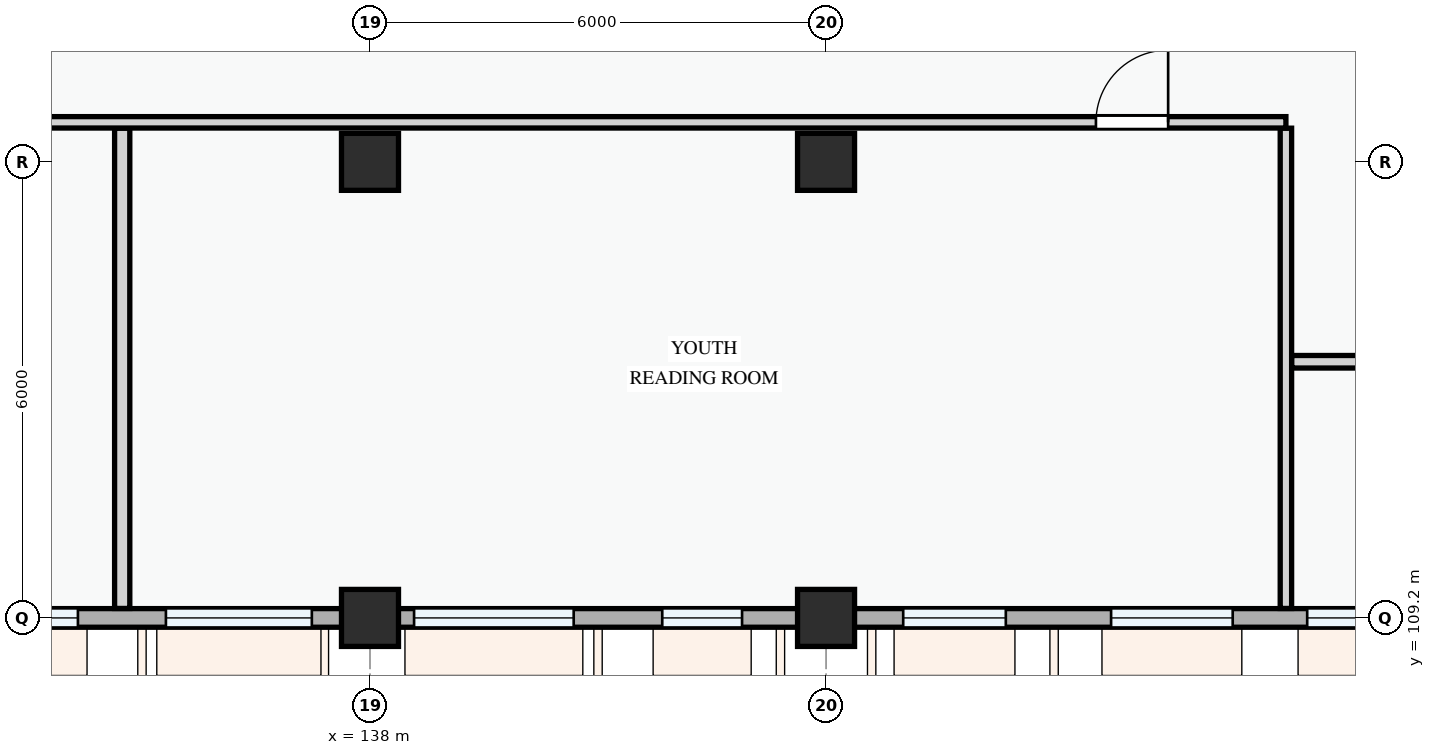
"""IFC4 building model, lengths in metres.
Left out: names, types, materials, properties, quantities, classifications, styles, units other than length and angle.
Written with IfcOpenShell. Run it as: python <this file> out.ifc"""

import sys

from ifc_helpers import new_model, si_unit, direction, frame, frame_2d, origin, origin_2d, place, context, subcontext, project, spatial, rectangle, extrude, element, fill, save


model = new_model("IFC4")
c1 = context("Model", 3, precision=1e-05, world=origin(), true_north=direction((0.0, 1.0)))
c2 = subcontext(c1, "Body", "Model", "MODEL_VIEW")
j1 = project(units=[si_unit("LENGTHUNIT", "METRE"), si_unit("PLANEANGLEUNIT", "RADIAN")], contexts=[c1])
p1 = place(None, origin())
s1 = spatial("IfcSite", under=j1, at=p1, CompositionType="ELEMENT")
p2 = place(p1, origin())
s2 = spatial("IfcBuilding", under=s1, at=p2, CompositionType="ELEMENT")
p3 = place(p2, frame((0.0, 0.0, 4.5)))
s3 = spatial("IfcBuildingStorey", under=s2, at=p3, CompositionType="ELEMENT", Elevation=4.5)
for number, where, z_axis, x_axis in (
    (1, (138.0, 109.2, 0.0), (0.0, 0.0, 1.0), (1.0, 0.0, 0.0)),
    (2, (138.0, 115.2, 0.0), (0.0, 0.0, 1.0), (1.0, 0.0, 0.0)),
    (3, (144.0, 109.2, 0.0), (0.0, 0.0, 1.0), (1.0, 0.0, 0.0)),
    (4, (144.0, 115.2, 0.0), (0.0, 0.0, 1.0), (1.0, 0.0, 0.0)),
):
    element("IfcColumn", number, at=place(p3, frame(where, z_axis=z_axis, x_axis=x_axis)), inside=s3, PredefinedType="COLUMN", context=c2, shape_type="SweptSolid", body=[
        extrude(rectangle(XDim=0.75, YDim=0.75, at=origin_2d()), origin(), (0.0, 0.0, 1.0), 3.6),
    ])
p4 = place(p3, frame((129.6, 109.2, 0.0), z_axis=(0.0, 0.0, 1.0), x_axis=(1.0, 0.0, 0.0)))
e5 = element("IfcWall", 5, at=p4, inside=s3, PredefinedType="STANDARD", context=c2, shape_type="SweptSolid", body=[
    extrude(rectangle(XDim=8.4, YDim=0.245, at=frame_2d((4.2, 0.0))), origin(), (0.0, 0.0, 1.0), 2.675),
])
p5 = place(p4, frame((0.488, 0.0, 0.78)))
e6 = element("IfcOpeningElement", 6, at=p5, cuts=e5, PredefinedType="OPENING", context=c2, shape_type="SweptSolid", body=[
    extrude(rectangle(XDim=1.95, YDim=1.65, at=frame_2d((0.975, 0.825))), frame((0.0, 0.133, 0.0), z_axis=(0.0, -1.0, 0.0), x_axis=(1.0, 0.0, 0.0)), (0.0, 0.0, 1.0), 0.265),
])
p6 = place(p4, frame((3.177, 0.0, 0.78)))
e7 = element("IfcOpeningElement", 7, at=p6, cuts=e5, PredefinedType="OPENING", context=c2, shape_type="SweptSolid", body=[
    extrude(rectangle(XDim=1.38, YDim=1.48, at=frame_2d((0.69, 0.74))), frame((0.0, 0.133, 0.0), z_axis=(0.0, -1.0, 0.0), x_axis=(1.0, 0.0, 0.0)), (0.0, 0.0, 1.0), 0.265),
])
p7 = place(p4, frame((5.715, 0.0, 0.78)))
e8 = element("IfcOpeningElement", 8, at=p7, cuts=e5, PredefinedType="OPENING", context=c2, shape_type="SweptSolid", body=[
    extrude(rectangle(XDim=1.92, YDim=1.44, at=frame_2d((0.96, 0.72))), frame((0.0, 0.133, 0.0), z_axis=(0.0, -1.0, 0.0), x_axis=(1.0, 0.0, 0.0)), (0.0, 0.0, 1.0), 0.265),
])
p8 = place(p3, frame((138.0, 109.2, 0.0), z_axis=(0.0, 0.0, 1.0), x_axis=(1.0, 0.0, 0.0)))
e9 = element("IfcWall", 9, at=p8, inside=s3, PredefinedType="STANDARD", context=c2, shape_type="SweptSolid", body=[
    extrude(rectangle(XDim=6.0, YDim=0.245, at=frame_2d((3.0, 0.0))), origin(), (0.0, 0.0, 1.0), 2.775),
])
p9 = place(p8, frame((0.58, 0.0, 0.78)))
e10 = element("IfcOpeningElement", 10, at=p9, cuts=e9, PredefinedType="OPENING", context=c2, shape_type="SweptSolid", body=[
    extrude(rectangle(XDim=2.1, YDim=1.8, at=frame_2d((1.05, 0.9))), frame((0.0, 0.133, 0.0), z_axis=(0.0, -1.0, 0.0), x_axis=(1.0, 0.0, 0.0)), (0.0, 0.0, 1.0), 0.265),
])
p10 = place(p8, frame((3.845, 0.0, 0.78)))
e11 = element("IfcOpeningElement", 11, at=p10, cuts=e9, PredefinedType="OPENING", context=c2, shape_type="SweptSolid", body=[
    extrude(rectangle(XDim=1.05, YDim=1.2, at=frame_2d((0.525, 0.6))), frame((0.0, 0.133, 0.0), z_axis=(0.0, -1.0, 0.0), x_axis=(1.0, 0.0, 0.0)), (0.0, 0.0, 1.0), 0.265),
])
p11 = place(p3, frame((144.0, 109.2, 0.0), z_axis=(0.0, 0.0, 1.0), x_axis=(1.0, 0.0, 0.0)))
e12 = element("IfcWall", 12, at=p11, inside=s3, PredefinedType="STANDARD", context=c2, shape_type="SweptSolid", body=[
    extrude(rectangle(XDim=8.4, YDim=0.245, at=frame_2d((4.2, 0.0))), origin(), (0.0, 0.0, 1.0), 2.675),
])
p12 = place(p11, frame((1.015, 0.0, 0.78)))
e13 = element("IfcOpeningElement", 13, at=p12, cuts=e12, PredefinedType="OPENING", context=c2, shape_type="SweptSolid", body=[
    extrude(rectangle(XDim=1.35, YDim=1.55, at=frame_2d((0.675, 0.775))), frame((0.0, 0.133, 0.0), z_axis=(0.0, -1.0, 0.0), x_axis=(1.0, 0.0, 0.0)), (0.0, 0.0, 1.0), 0.265),
])
p13 = place(p11, frame((3.75, 0.0, 0.78)))
e14 = element("IfcOpeningElement", 14, at=p13, cuts=e12, PredefinedType="OPENING", context=c2, shape_type="SweptSolid", body=[
    extrude(rectangle(XDim=1.6, YDim=1.75, at=frame_2d((0.8, 0.875))), frame((0.0, 0.133, 0.0), z_axis=(0.0, -1.0, 0.0), x_axis=(1.0, 0.0, 0.0)), (0.0, 0.0, 1.0), 0.265),
])
p14 = place(p11, frame((6.33, 0.0, 0.78)))
e15 = element("IfcOpeningElement", 15, at=p14, cuts=e12, PredefinedType="OPENING", context=c2, shape_type="SweptSolid", body=[
    extrude(rectangle(XDim=1.6, YDim=1.75, at=frame_2d((0.8, 0.875))), frame((0.0, 0.133, 0.0), z_axis=(0.0, -1.0, 0.0), x_axis=(1.0, 0.0, 0.0)), (0.0, 0.0, 1.0), 0.265),
])
p15 = place(p3, frame((150.05, 109.324, 0.0), z_axis=(0.0, 0.0, 1.0), x_axis=(0.0, 1.0, 0.0)))
e16 = element("IfcWall", 16, at=p15, inside=s3, PredefinedType="PARTITIONING", context=c2, shape_type="SweptSolid", body=[
    extrude(rectangle(XDim=6.319, YDim=0.15, at=frame_2d((3.159, 0.0))), origin(), (0.0, 0.0, 1.0), 3.3),
])
p16 = place(p3, frame((150.127, 112.57, 0.0), z_axis=(0.0, 0.0, 1.0), x_axis=(1.0, 0.0, 0.0)))
e17 = element("IfcWall", 17, at=p16, inside=s3, PredefinedType="PARTITIONING", context=c2, shape_type="SweptSolid", body=[
    extrude(rectangle(XDim=2.413, YDim=0.165, at=frame_2d((1.207, 0.0))), origin(), (0.0, 0.0, 1.0), 3.3),
])
p17 = place(p3, frame((134.74, 109.324, 0.0), z_axis=(0.0, 0.0, 1.0), x_axis=(0.0, 1.0, 0.0)))
e18 = element("IfcWall", 18, at=p17, inside=s3, PredefinedType="PARTITIONING", context=c2, shape_type="SweptSolid", body=[
    extrude(rectangle(XDim=6.319, YDim=0.2, at=frame_2d((3.159, 0.0))), origin(), (0.0, 0.0, 1.0), 3.3),
])
p18 = place(p3, frame((80.524, 115.72, 0.0), z_axis=(0.0, 0.0, 1.0), x_axis=(1.0, 0.0, 0.0)))
e19 = element("IfcWall", 19, at=p18, inside=s3, PredefinedType="PARTITIONING", context=c2, shape_type="SweptSolid", body=[
    extrude(rectangle(XDim=69.526, YDim=0.15, at=frame_2d((34.763, 0.0))), origin(), (0.0, 0.0, 1.0), 3.3),
])
p19 = place(p18, frame((9.656, 0.0, 0.0)))
e20 = element("IfcOpeningElement", 20, at=p19, cuts=e19, PredefinedType="OPENING", context=c2, shape_type="SweptSolid", body=[
    extrude(rectangle(XDim=0.95, YDim=2.1, at=frame_2d((0.475, 1.05))), frame((0.0, 0.085, 0.0), z_axis=(0.0, -1.0, 0.0), x_axis=(1.0, 0.0, 0.0)), (0.0, 0.0, 1.0), 0.17),
])
p20 = place(p18, frame((24.2, 0.0, 0.0)))
e21 = element("IfcOpeningElement", 21, at=p20, cuts=e19, PredefinedType="OPENING", context=c2, shape_type="SweptSolid", body=[
    extrude(rectangle(XDim=0.95, YDim=2.1, at=frame_2d((0.475, 1.05))), frame((0.0, 0.085, 0.0), z_axis=(0.0, -1.0, 0.0), x_axis=(1.0, 0.0, 0.0)), (0.0, 0.0, 1.0), 0.17),
])
p21 = place(p18, frame((38.208, 0.0, 0.0)))
e22 = element("IfcOpeningElement", 22, at=p21, cuts=e19, PredefinedType="OPENING", context=c2, shape_type="SweptSolid", body=[
    extrude(rectangle(XDim=0.95, YDim=2.1, at=frame_2d((0.475, 1.05))), frame((0.0, 0.085, 0.0), z_axis=(0.0, -1.0, 0.0), x_axis=(1.0, 0.0, 0.0)), (0.0, 0.0, 1.0), 0.17),
])
p22 = place(p18, frame((67.026, 0.0, 0.0)))
e23 = element("IfcOpeningElement", 23, at=p22, cuts=e19, PredefinedType="OPENING", context=c2, shape_type="SweptSolid", body=[
    extrude(rectangle(XDim=0.95, YDim=2.1, at=frame_2d((0.475, 1.05))), frame((0.0, 0.085, 0.0), z_axis=(0.0, -1.0, 0.0), x_axis=(1.0, 0.0, 0.0)), (0.0, 0.0, 1.0), 0.17),
])
p23 = place(p6, origin())
e24 = element("IfcWindow", 24, at=p23, inside=s3, PartitioningType="SINGLE_PANEL", PredefinedType="WINDOW", context=c2, shape_type="SweptSolid", body=[
    extrude(rectangle(XDim=1.38, YDim=1.48, at=frame_2d((0.69, 0.74))), frame((0.0, 0.03, 0.0), z_axis=(0.0, -1.0, 0.0), x_axis=(1.0, 0.0, 0.0)), (0.0, 0.0, 1.0), 0.06),
])
fill(e7, e24)
p24 = place(p7, origin())
e25 = element("IfcWindow", 25, at=p24, inside=s3, PartitioningType="DOUBLE_PANEL_VERTICAL", PredefinedType="WINDOW", context=c2, shape_type="SweptSolid", body=[
    extrude(rectangle(XDim=1.92, YDim=1.44, at=frame_2d((0.96, 0.72))), frame((0.0, 0.03, 0.0), z_axis=(0.0, -1.0, 0.0), x_axis=(1.0, 0.0, 0.0)), (0.0, 0.0, 1.0), 0.06),
])
fill(e8, e25)
p25 = place(p9, origin())
e26 = element("IfcWindow", 26, at=p25, inside=s3, PartitioningType="DOUBLE_PANEL_VERTICAL", PredefinedType="WINDOW", context=c2, shape_type="SweptSolid", body=[
    extrude(rectangle(XDim=2.1, YDim=1.8, at=frame_2d((1.05, 0.9))), frame((0.0, 0.03, 0.0), z_axis=(0.0, -1.0, 0.0), x_axis=(1.0, 0.0, 0.0)), (0.0, 0.0, 1.0), 0.06),
])
fill(e10, e26)
p26 = place(p10, origin())
e27 = element("IfcWindow", 27, at=p26, inside=s3, PartitioningType="SINGLE_PANEL", PredefinedType="WINDOW", context=c2, shape_type="SweptSolid", body=[
    extrude(rectangle(XDim=1.05, YDim=1.2, at=frame_2d((0.525, 0.6))), frame((0.0, 0.03, 0.0), z_axis=(0.0, -1.0, 0.0), x_axis=(1.0, 0.0, 0.0)), (0.0, 0.0, 1.0), 0.06),
])
fill(e11, e27)
p27 = place(p12, origin())
e28 = element("IfcWindow", 28, at=p27, inside=s3, PartitioningType="SINGLE_PANEL", PredefinedType="WINDOW", context=c2, shape_type="SweptSolid", body=[
    extrude(rectangle(XDim=1.35, YDim=1.55, at=frame_2d((0.675, 0.775))), frame((0.0, 0.03, 0.0), z_axis=(0.0, -1.0, 0.0), x_axis=(1.0, 0.0, 0.0)), (0.0, 0.0, 1.0), 0.06),
])
fill(e13, e28)
p28 = place(p13, origin())
e29 = element("IfcWindow", 29, at=p28, inside=s3, PartitioningType="DOUBLE_PANEL_VERTICAL", PredefinedType="WINDOW", context=c2, shape_type="SweptSolid", body=[
    extrude(rectangle(XDim=1.6, YDim=1.75, at=frame_2d((0.8, 0.875))), frame((0.0, 0.03, 0.0), z_axis=(0.0, -1.0, 0.0), x_axis=(1.0, 0.0, 0.0)), (0.0, 0.0, 1.0), 0.06),
])
fill(e14, e29)
p29 = place(p14, origin())
e30 = element("IfcWindow", 30, at=p29, inside=s3, PartitioningType="DOUBLE_PANEL_VERTICAL", PredefinedType="WINDOW", context=c2, shape_type="SweptSolid", body=[
    extrude(rectangle(XDim=1.6, YDim=1.75, at=frame_2d((0.8, 0.875))), frame((0.0, 0.03, 0.0), z_axis=(0.0, -1.0, 0.0), x_axis=(1.0, 0.0, 0.0)), (0.0, 0.0, 1.0), 0.06),
])
fill(e15, e30)
p30 = place(p22, origin())
e31 = element("IfcDoor", 31, at=p30, inside=s3, OperationType="SINGLE_SWING_RIGHT", PredefinedType="DOOR", context=c2, shape_type="SweptSolid", body=[
    extrude(rectangle(XDim=0.95, YDim=2.1, at=frame_2d((0.475, 1.05))), frame((0.0, 0.025, 0.0), z_axis=(0.0, -1.0, 0.0), x_axis=(1.0, 0.0, 0.0)), (0.0, 0.0, 1.0), 0.05),
])
fill(e23, e31)
save(model, sys.argv[1])
